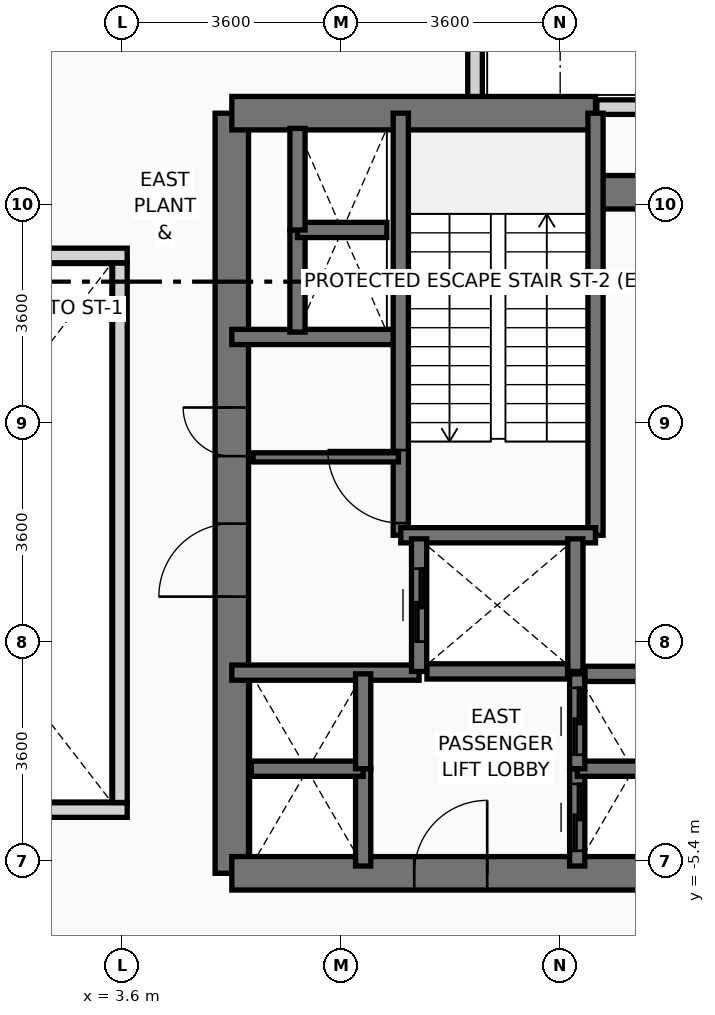
"""IFC4 building model, lengths in metres.
Left out: names, types, materials, properties, quantities, classifications, styles, units other than length and angle.
Written with IfcOpenShell. Run it as: python <this file> out.ifc"""

import sys

from ifc_helpers import new_model, si_unit, direction, frame, frame_2d, origin, place, context, subcontext, project, spatial, rectangle, extrude, source, transform, mapped, element, fill, save


model = new_model("IFC4")
c1 = context("Model", 3, precision=1e-05, world=origin(), true_north=direction((0.0, 1.0)))
c2 = subcontext(c1, "Body", "Model", "MODEL_VIEW")
j1 = project(units=[si_unit("LENGTHUNIT", "METRE"), si_unit("PLANEANGLEUNIT", "RADIAN")], contexts=[c1])
p1 = place(None, origin())
s1 = spatial("IfcSite", under=j1, at=p1, CompositionType="ELEMENT")
p2 = place(p1, origin())
s2 = spatial("IfcBuilding", under=s1, at=p2, CompositionType="ELEMENT")
p3 = place(p2, frame((0.0, 0.0, 88.4)))
s3 = spatial("IfcBuildingStorey", under=s2, at=p3, CompositionType="ELEMENT", Elevation=88.4)
p4 = place(p3, frame((9.4, 8.397, 0.0), z_axis=(0.0, 0.0, 1.0), x_axis=(0.0, -1.0, 0.0)))
e1 = element("IfcWall", 1, at=p4, inside=s3, PredefinedType="PARAPET", context=c2, shape_type="SweptSolid", body=[
    extrude(rectangle(XDim=1.444, YDim=0.24, at=frame_2d((0.722, 0.0))), origin(), (0.0, 0.0, 1.0), 1.15),
])
p5 = place(p3, frame((11.403, 7.0, 0.0), z_axis=(0.0, 0.0, 1.0), x_axis=(1.0, 0.0, 0.0)))
e2 = element("IfcWall", 2, at=p5, inside=s3, PredefinedType="PARAPET", context=c2, shape_type="SweptSolid", body=[
    extrude(rectangle(XDim=2.619, YDim=0.24, at=frame_2d((1.31, 0.0))), origin(), (0.0, 0.0, 1.0), 1.15),
])
p6 = place(p3, frame((5.4, -5.6, 0.0), z_axis=(0.0, 0.0, 1.0), x_axis=(0.0, 1.0, 0.0)))
e3 = element("IfcWall", 3, at=p6, inside=s3, PredefinedType="SHEAR", context=c2, shape_type="SweptSolid", body=[
    extrude(rectangle(XDim=12.5, YDim=0.55, at=frame_2d((6.25, 0.0))), origin(), (0.0, 0.0, 1.0), 4.4),
])
p7 = place(p6, frame((4.55, 0.0, 0.0)))
e4 = element("IfcOpeningElement", 4, at=p7, cuts=e3, PredefinedType="OPENING", context=c2, shape_type="SweptSolid", body=[
    extrude(rectangle(XDim=1.2, YDim=2.2, at=frame_2d((0.6, 1.1))), frame((0.0, 0.285, 0.0), z_axis=(0.0, -1.0, 0.0), x_axis=(1.0, 0.0, 0.0)), (0.0, 0.0, 1.0), 0.57),
])
p8 = place(p6, frame((6.86, 0.0, 0.0)))
e5 = element("IfcOpeningElement", 5, at=p8, cuts=e3, PredefinedType="OPENING", context=c2, shape_type="SweptSolid", body=[
    extrude(rectangle(XDim=0.8, YDim=2.1, at=frame_2d((0.4, 1.05))), frame((0.0, 0.285, 0.0), z_axis=(0.0, -1.0, 0.0), x_axis=(1.0, 0.0, 0.0)), (0.0, 0.0, 1.0), 0.57),
])
p9 = place(p3, frame((5.4, 6.9, 0.0), z_axis=(0.0, 0.0, 1.0), x_axis=(1.0, 0.0, 0.0)))
e6 = element("IfcWall", 6, at=p9, inside=s3, PredefinedType="SHEAR", context=c2, shape_type="SweptSolid", body=[
    extrude(rectangle(XDim=5.981, YDim=0.55, at=frame_2d((2.991, 0.0))), origin(), (0.0, 0.0, 1.0), 4.4),
])
p10 = place(p3, frame((11.381, 5.6, 0.0), z_axis=(0.0, 0.0, 1.0), x_axis=(1.0, 0.0, 0.0)))
e7 = element("IfcWall", 7, at=p10, inside=s3, PredefinedType="SHEAR", context=c2, shape_type="SweptSolid", body=[
    extrude(rectangle(XDim=1.819, YDim=0.55, at=frame_2d((0.909, 0.0))), origin(), (0.0, 0.0, 1.0), 4.4),
])
p11 = place(p3, frame((5.4, -5.6, 0.0), z_axis=(0.0, 0.0, 1.0), x_axis=(1.0, 0.0, 0.0)))
e8 = element("IfcWall", 8, at=p11, inside=s3, PredefinedType="SHEAR", context=c2, shape_type="SweptSolid", body=[
    extrude(rectangle(XDim=7.8, YDim=0.55, at=frame_2d((3.9, 0.0))), origin(), (0.0, 0.0, 1.0), 4.4),
])
p12 = place(p11, frame((3.0, 0.0, 0.0)))
e9 = element("IfcOpeningElement", 9, at=p12, cuts=e8, PredefinedType="OPENING", context=c2, shape_type="SweptSolid", body=[
    extrude(rectangle(XDim=1.2, YDim=2.2, at=frame_2d((0.6, 1.1))), frame((0.0, 0.285, 0.0), z_axis=(0.0, -1.0, 0.0), x_axis=(1.0, 0.0, 0.0)), (0.0, 0.0, 1.0), 0.57),
])
p13 = place(p3, frame((5.4, 3.22, 0.0), z_axis=(0.0, 0.0, 1.0), x_axis=(1.0, 0.0, 0.0)))
e10 = element("IfcWall", 10, at=p13, inside=s3, PredefinedType="SOLIDWALL", context=c2, shape_type="SweptSolid", body=[
    extrude(rectangle(XDim=2.78, YDim=0.25, at=frame_2d((1.39, 0.0))), origin(), (0.0, 0.0, 1.0), 4.4),
])
p14 = place(p3, frame((5.4, -2.3, 0.0), z_axis=(0.0, 0.0, 1.0), x_axis=(1.0, 0.0, 0.0)))
e11 = element("IfcWall", 11, at=p14, inside=s3, PredefinedType="SOLIDWALL", context=c2, shape_type="SweptSolid", body=[
    extrude(rectangle(XDim=3.08, YDim=0.25, at=frame_2d((1.54, 0.0))), origin(), (0.0, 0.0, 1.0), 4.4),
])
p15 = place(p3, frame((8.179, -0.041, 0.0), z_axis=(0.0, 0.0, 1.0), x_axis=(0.0, 1.0, 0.0)))
e12 = element("IfcWall", 12, at=p15, inside=s3, PredefinedType="SOLIDWALL", context=c2, shape_type="SweptSolid", body=[
    extrude(rectangle(XDim=6.941, YDim=0.25, at=frame_2d((3.47, 0.0))), origin(), (0.0, 0.0, 1.0), 4.4),
])
p16 = place(p15, frame((0.2, 0.0, 0.0)))
e13 = element("IfcOpeningElement", 13, at=p16, cuts=e12, PredefinedType="OPENING", context=c2, shape_type="SweptSolid", body=[
    extrude(rectangle(XDim=1.2, YDim=2.2, at=frame_2d((0.6, 1.1))), frame((0.0, 0.135, 0.0), z_axis=(0.0, -1.0, 0.0), x_axis=(1.0, 0.0, 0.0)), (0.0, 0.0, 1.0), 0.27),
])
p17 = place(p3, frame((11.381, -0.041, 0.0), z_axis=(0.0, 0.0, 1.0), x_axis=(0.0, 1.0, 0.0)))
e14 = element("IfcWall", 14, at=p17, inside=s3, PredefinedType="SOLIDWALL", context=c2, shape_type="SweptSolid", body=[
    extrude(rectangle(XDim=6.941, YDim=0.25, at=frame_2d((3.47, 0.0))), origin(), (0.0, 0.0, 1.0), 4.4),
])
p18 = place(p3, frame((8.179, -0.041, 0.0), z_axis=(0.0, 0.0, 1.0), x_axis=(1.0, 0.0, 0.0)))
e15 = element("IfcWall", 15, at=p18, inside=s3, PredefinedType="SOLIDWALL", context=c2, shape_type="SweptSolid", body=[
    extrude(rectangle(XDim=3.202, YDim=0.25, at=frame_2d((1.601, 0.0))), origin(), (0.0, 0.0, 1.0), 4.4),
])
p19 = place(p3, frame((8.48, -2.28, 0.0), z_axis=(0.0, 0.0, 1.0), x_axis=(0.0, 1.0, 0.0)))
e16 = element("IfcWall", 16, at=p19, inside=s3, PredefinedType="SOLIDWALL", context=c2, shape_type="SweptSolid", body=[
    extrude(rectangle(XDim=2.18, YDim=0.25, at=frame_2d((1.09, 0.0))), origin(), (0.0, 0.0, 1.0), 4.4),
])
p20 = place(p19, frame((0.49, 0.0, 0.0)))
e17 = element("IfcOpeningElement", 17, at=p20, cuts=e16, PredefinedType="OPENING", context=c2, shape_type="SweptSolid", body=[
    extrude(rectangle(XDim=1.2, YDim=2.2, at=frame_2d((0.6, 1.1))), frame((0.0, 0.135, 0.0), z_axis=(0.0, -1.0, 0.0), x_axis=(1.0, 0.0, 0.0)), (0.0, 0.0, 1.0), 0.27),
])
p21 = place(p3, frame((11.05, -2.28, 0.0), z_axis=(0.0, 0.0, 1.0), x_axis=(0.0, 1.0, 0.0)))
e18 = element("IfcWall", 18, at=p21, inside=s3, PredefinedType="SOLIDWALL", context=c2, shape_type="SweptSolid", body=[
    extrude(rectangle(XDim=2.18, YDim=0.25, at=frame_2d((1.09, 0.0))), origin(), (0.0, 0.0, 1.0), 4.4),
])
p22 = place(p3, frame((8.609, -2.28, 0.0), z_axis=(0.0, 0.0, 1.0), x_axis=(1.0, 0.0, 0.0)))
e19 = element("IfcWall", 19, at=p22, inside=s3, PredefinedType="SOLIDWALL", context=c2, shape_type="SweptSolid", body=[
    extrude(rectangle(XDim=2.312, YDim=0.25, at=frame_2d((1.156, 0.0))), origin(), (0.0, 0.0, 1.0), 4.4),
])
p23 = place(p3, frame((11.08, -5.48, 0.0), z_axis=(0.0, 0.0, 1.0), x_axis=(0.0, 1.0, 0.0)))
e20 = element("IfcWall", 20, at=p23, inside=s3, PredefinedType="SOLIDWALL", context=c2, shape_type="SweptSolid", body=[
    extrude(rectangle(XDim=1.6, YDim=0.25, at=frame_2d((0.8, 0.0))), origin(), (0.0, 0.0, 1.0), 4.4),
])
p24 = place(p23, frame((0.25, 0.0, 0.0)))
e21 = element("IfcOpeningElement", 21, at=p24, cuts=e20, PredefinedType="OPENING", context=c2, shape_type="SweptSolid", body=[
    extrude(rectangle(XDim=1.1, YDim=2.2, at=frame_2d((0.55, 1.1))), frame((0.0, 0.135, 0.0), z_axis=(0.0, -1.0, 0.0), x_axis=(1.0, 0.0, 0.0)), (0.0, 0.0, 1.0), 0.27),
])
p25 = place(p3, frame((11.08, -3.88, 0.0), z_axis=(0.0, 0.0, 1.0), x_axis=(1.0, 0.0, 0.0)))
e22 = element("IfcWall", 22, at=p25, inside=s3, PredefinedType="SOLIDWALL", context=c2, shape_type="SweptSolid", body=[
    extrude(rectangle(XDim=1.84, YDim=0.25, at=frame_2d((0.92, 0.0))), origin(), (0.0, 0.0, 1.0), 4.4),
])
p26 = place(p3, frame((11.08, -3.88, 0.0), z_axis=(0.0, 0.0, 1.0), x_axis=(0.0, 1.0, 0.0)))
e23 = element("IfcWall", 23, at=p26, inside=s3, PredefinedType="SOLIDWALL", context=c2, shape_type="SweptSolid", body=[
    extrude(rectangle(XDim=1.56, YDim=0.25, at=frame_2d((0.78, 0.0))), origin(), (0.0, 0.0, 1.0), 4.4),
])
p27 = place(p26, frame((0.23, 0.0, 0.0)))
e24 = element("IfcOpeningElement", 24, at=p27, cuts=e23, PredefinedType="OPENING", context=c2, shape_type="SweptSolid", body=[
    extrude(rectangle(XDim=1.1, YDim=2.2, at=frame_2d((0.55, 1.1))), frame((0.0, 0.135, 0.0), z_axis=(0.0, -1.0, 0.0), x_axis=(1.0, 0.0, 0.0)), (0.0, 0.0, 1.0), 0.27),
])
p28 = place(p3, frame((11.209, -2.32, 0.0), z_axis=(0.0, 0.0, 1.0), x_axis=(1.0, 0.0, 0.0)))
e25 = element("IfcWall", 25, at=p28, inside=s3, PredefinedType="SOLIDWALL", context=c2, shape_type="SweptSolid", body=[
    extrude(rectangle(XDim=1.582, YDim=0.25, at=frame_2d((0.791, 0.0))), origin(), (0.0, 0.0, 1.0), 4.4),
])
p29 = place(p3, frame((7.56, -5.48, 0.0), z_axis=(0.0, 0.0, 1.0), x_axis=(0.0, 1.0, 0.0)))
e26 = element("IfcWall", 26, at=p29, inside=s3, PredefinedType="SOLIDWALL", context=c2, shape_type="SweptSolid", body=[
    extrude(rectangle(XDim=1.6, YDim=0.25, at=frame_2d((0.8, 0.0))), origin(), (0.0, 0.0, 1.0), 4.4),
])
p30 = place(p3, frame((5.72, -3.88, 0.0), z_axis=(0.0, 0.0, 1.0), x_axis=(1.0, 0.0, 0.0)))
e27 = element("IfcWall", 27, at=p30, inside=s3, PredefinedType="SOLIDWALL", context=c2, shape_type="SweptSolid", body=[
    extrude(rectangle(XDim=1.84, YDim=0.25, at=frame_2d((0.92, 0.0))), origin(), (0.0, 0.0, 1.0), 4.4),
])
p31 = place(p3, frame((7.56, -3.88, 0.0), z_axis=(0.0, 0.0, 1.0), x_axis=(0.0, 1.0, 0.0)))
e28 = element("IfcWall", 28, at=p31, inside=s3, PredefinedType="SOLIDWALL", context=c2, shape_type="SweptSolid", body=[
    extrude(rectangle(XDim=1.56, YDim=0.25, at=frame_2d((0.78, 0.0))), origin(), (0.0, 0.0, 1.0), 4.4),
])
p32 = place(p3, frame((6.48, 3.3, 0.0), z_axis=(0.0, 0.0, 1.0), x_axis=(0.0, 1.0, 0.0)))
e29 = element("IfcWall", 29, at=p32, inside=s3, PredefinedType="SOLIDWALL", context=c2, shape_type="SweptSolid", body=[
    extrude(rectangle(XDim=1.68, YDim=0.25, at=frame_2d((0.84, 0.0))), origin(), (0.0, 0.0, 1.0), 4.4),
])
p33 = place(p3, frame((6.48, 4.98, 0.0), z_axis=(0.0, 0.0, 1.0), x_axis=(1.0, 0.0, 0.0)))
e30 = element("IfcWall", 30, at=p33, inside=s3, PredefinedType="SOLIDWALL", context=c2, shape_type="SweptSolid", body=[
    extrude(rectangle(XDim=1.47, YDim=0.25, at=frame_2d((0.735, 0.0))), origin(), (0.0, 0.0, 1.0), 4.4),
])
p34 = place(p3, frame((6.48, 4.98, 0.0), z_axis=(0.0, 0.0, 1.0), x_axis=(0.0, 1.0, 0.0)))
e31 = element("IfcWall", 31, at=p34, inside=s3, PredefinedType="SOLIDWALL", context=c2, shape_type="SweptSolid", body=[
    extrude(rectangle(XDim=1.67, YDim=0.25, at=frame_2d((0.835, 0.0))), origin(), (0.0, 0.0, 1.0), 4.4),
])
p35 = place(p3, frame((5.75, 1.24, 0.0), z_axis=(0.0, 0.0, 1.0), x_axis=(1.0, 0.0, 0.0)))
e32 = element("IfcWall", 32, at=p35, inside=s3, PredefinedType="PARTITIONING", context=c2, shape_type="SweptSolid", body=[
    extrude(rectangle(XDim=2.39, YDim=0.15, at=frame_2d((1.195, 0.0))), origin(), (0.0, 0.0, 1.0), 3.5),
])
for number, where, z_axis, x_axis in (
    (33, (-3.68, -4.56, 0.0), (0.0, 0.0, 1.0), (1.0, 0.0, 0.0)),
    (34, (-3.68, 4.56, 0.0), (0.0, 0.0, 1.0), (1.0, 0.0, 0.0)),
):
    element("IfcWall", number, at=place(p3, frame(where, z_axis=z_axis, x_axis=x_axis)), inside=s3, PredefinedType="PARAPET", context=c2, shape_type="SweptSolid", body=[
        extrude(rectangle(XDim=7.36, YDim=0.24, at=frame_2d((3.68, 0.0))), origin(), (0.0, 0.0, 1.0), 1.15),
    ])
p36 = place(p3, frame((3.56, -4.435, 0.0), z_axis=(0.0, 0.0, 1.0), x_axis=(0.0, 1.0, 0.0)))
e35 = element("IfcWall", 35, at=p36, inside=s3, PredefinedType="PARAPET", context=c2, shape_type="SweptSolid", body=[
    extrude(rectangle(XDim=8.87, YDim=0.24, at=frame_2d((4.435, 0.0))), origin(), (0.0, 0.0, 1.0), 1.15),
])
m1 = source(origin(), c2, "Body", "SweptSolid", [
    extrude(rectangle(XDim=1.2, YDim=2.2, at=frame_2d((0.6, 1.1))), frame((0.0, 0.025, 0.0), z_axis=(0.0, -1.0, 0.0), x_axis=(1.0, 0.0, 0.0)), (0.0, 0.0, 1.0), 0.05),
])
p37 = place(p16, origin())
e36 = element("IfcDoor", 36, at=p37, inside=s3, OperationType="SINGLE_SWING_RIGHT", PredefinedType="DOOR", context=c2, shape_type="MappedRepresentation", body=[
    mapped(m1, transform((0.0, 0.0, 0.0), x_axis=(1.0, 0.0, 0.0), y_axis=(0.0, 1.0, 0.0), z_axis=(0.0, 0.0, 1.0), scale=1.0)),
])
fill(e13, e36)
p38 = place(p7, origin())
e37 = element("IfcDoor", 37, at=p38, inside=s3, OperationType="SINGLE_SWING_LEFT", PredefinedType="DOOR", context=c2, shape_type="MappedRepresentation", body=[
    mapped(m1, transform((0.0, 0.0, 0.0), x_axis=(1.0, 0.0, 0.0), y_axis=(0.0, 1.0, 0.0), z_axis=(0.0, 0.0, 1.0), scale=1.0)),
])
fill(e4, e37)
p39 = place(p12, origin())
e38 = element("IfcDoor", 38, at=p39, inside=s3, OperationType="SINGLE_SWING_RIGHT", PredefinedType="DOOR", context=c2, shape_type="MappedRepresentation", body=[
    mapped(m1, transform((0.0, 0.0, 0.0), x_axis=(1.0, 0.0, 0.0), y_axis=(0.0, 1.0, 0.0), z_axis=(0.0, 0.0, 1.0), scale=1.0)),
])
fill(e9, e38)
m2 = source(origin(), c2, "Body", "SweptSolid", [
    extrude(rectangle(XDim=0.8, YDim=2.1, at=frame_2d((0.4, 1.05))), frame((0.0, 0.025, 0.0), z_axis=(0.0, -1.0, 0.0), x_axis=(1.0, 0.0, 0.0)), (0.0, 0.0, 1.0), 0.05),
])
p40 = place(p8, origin())
e39 = element("IfcDoor", 39, at=p40, inside=s3, OperationType="SINGLE_SWING_RIGHT", PredefinedType="DOOR", context=c2, shape_type="MappedRepresentation", body=[
    mapped(m2, transform((0.0, 0.0, 0.0), x_axis=(1.0, 0.0, 0.0), y_axis=(0.0, 1.0, 0.0), z_axis=(0.0, 0.0, 1.0), scale=1.0)),
])
fill(e5, e39)
p41 = place(p20, origin())
e40 = element("IfcDoor", 40, at=p41, inside=s3, OperationType="SLIDING_TO_RIGHT", PredefinedType="DOOR", context=c2, shape_type="MappedRepresentation", body=[
    mapped(m1, transform((0.0, 0.0, 0.0), x_axis=(1.0, 0.0, 0.0), y_axis=(0.0, 1.0, 0.0), z_axis=(0.0, 0.0, 1.0), scale=1.0)),
])
fill(e17, e40)
m3 = source(origin(), c2, "Body", "SweptSolid", [
    extrude(rectangle(XDim=1.1, YDim=2.2, at=frame_2d((0.55, 1.1))), frame((0.0, 0.025, 0.0), z_axis=(0.0, -1.0, 0.0), x_axis=(1.0, 0.0, 0.0)), (0.0, 0.0, 1.0), 0.05),
])
p42 = place(p24, origin())
e41 = element("IfcDoor", 41, at=p42, inside=s3, OperationType="SLIDING_TO_LEFT", PredefinedType="DOOR", context=c2, shape_type="MappedRepresentation", body=[
    mapped(m3, transform((0.0, 0.0, 0.0), x_axis=(1.0, 0.0, 0.0), y_axis=(0.0, 1.0, 0.0), z_axis=(0.0, 0.0, 1.0), scale=1.0)),
])
fill(e21, e41)
p43 = place(p27, origin())
e42 = element("IfcDoor", 42, at=p43, inside=s3, OperationType="SLIDING_TO_LEFT", PredefinedType="DOOR", context=c2, shape_type="MappedRepresentation", body=[
    mapped(m3, transform((0.0, 0.0, 0.0), x_axis=(1.0, 0.0, 0.0), y_axis=(0.0, 1.0, 0.0), z_axis=(0.0, 0.0, 1.0), scale=1.0)),
])
fill(e24, e42)
save(model, sys.argv[1])
